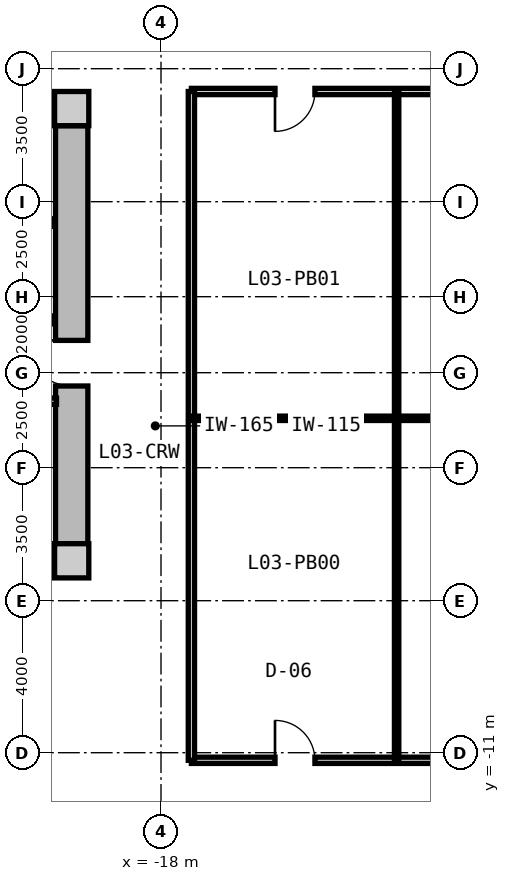
"""IFC4 building model, lengths in metres.
Left out: names, types, materials, properties, quantities, classifications, styles, units other than length and angle.
Written with IfcOpenShell. Run it as: python <this file> out.ifc"""

import sys

from ifc_helpers import new_model, si_unit, direction, frame, frame_2d, origin, origin_2d, place, context, subcontext, project, spatial, rectangle, extrude, source, transform, mapped, element, fill, save


model = new_model("IFC4")
c1 = context("Model", 3, precision=1e-05, world=origin(), true_north=direction((0.0, 1.0)))
c2 = subcontext(c1, "Body", "Model", "MODEL_VIEW")
j1 = project(units=[si_unit("LENGTHUNIT", "METRE"), si_unit("PLANEANGLEUNIT", "RADIAN")], contexts=[c1])
p1 = place(None, origin())
s1 = spatial("IfcSite", under=j1, at=p1, CompositionType="ELEMENT")
p2 = place(p1, origin())
s2 = spatial("IfcBuilding", under=s1, at=p2, CompositionType="ELEMENT")
p3 = place(p2, frame((0.0, 0.0, 12.6)))
s3 = spatial("IfcBuildingStorey", under=s2, at=p3, CompositionType="ELEMENT", Elevation=12.6)
m1 = source(origin(), c2, "Body", "SweptSolid", [
    extrude(rectangle(XDim=0.9, YDim=0.9, at=origin_2d()), origin(), (0.0, 0.0, 1.0), 4.2),
])
for number, where, z_axis, x_axis in (
    (1, (-20.35, -5.95, 0.0), (0.0, 0.0, 1.0), (1.0, 0.0, 0.0)),
    (2, (-20.35, 5.95, 0.0), (0.0, 0.0, 1.0), (1.0, 0.0, 0.0)),
):
    element("IfcColumn", number, at=place(p3, frame(where, z_axis=z_axis, x_axis=x_axis)), inside=s3, PredefinedType="COLUMN", context=c2, shape_type="MappedRepresentation", body=[
        mapped(m1, transform((0.0, 0.0, 0.0), x_axis=(1.0, 0.0, 0.0), y_axis=(0.0, 1.0, 0.0), z_axis=(0.0, 0.0, 1.0), scale=1.0)),
    ])
m2 = source(origin(), c2, "Body", "SweptSolid", [
    extrude(rectangle(XDim=14.4, YDim=0.85, at=frame_2d((7.2, 0.0))), origin(), (0.0, 0.0, 1.0), 3.88),
])
for number, where, z_axis, x_axis in (
    (3, (-35.2, 5.95, 0.0), (0.0, 0.0, 1.0), (1.0, 0.0, 0.0)),
    (4, (-20.8, -5.95, 0.0), (0.0, 0.0, 1.0), (-1.0, 0.0, 0.0)),
):
    element("IfcWall", number, at=place(p3, frame(where, z_axis=z_axis, x_axis=x_axis)), inside=s3, PredefinedType="SHEAR", context=c2, shape_type="MappedRepresentation", body=[
        mapped(m2, transform((0.0, 0.0, 0.0), x_axis=(1.0, 0.0, 0.0), y_axis=(0.0, 1.0, 0.0), z_axis=(0.0, 0.0, 1.0), scale=1.0)),
    ])
m3 = source(origin(), c2, "Body", "SweptSolid", [
    extrude(rectangle(XDim=11.0, YDim=0.85, at=frame_2d((5.5, 0.0))), origin(), (0.0, 0.0, 1.0), 3.88),
])
p4 = place(p3, frame((-20.35, 5.5, 0.0), z_axis=(0.0, 0.0, 1.0), x_axis=(0.0, -1.0, 0.0)))
e5 = element("IfcWall", 5, at=p4, inside=s3, PredefinedType="SHEAR", context=c2, shape_type="MappedRepresentation", body=[
    mapped(m3, transform((0.0, 0.0, 0.0), x_axis=(1.0, 0.0, 0.0), y_axis=(0.0, 1.0, 0.0), z_axis=(0.0, 0.0, 1.0), scale=1.0)),
])
p5 = place(p4, frame((5.65, 0.0, 0.0)))
e6 = element("IfcOpeningElement", 6, at=p5, cuts=e5, PredefinedType="OPENING", context=c2, shape_type="SweptSolid", body=[
    extrude(rectangle(XDim=1.2, YDim=2.15, at=frame_2d((0.6, 1.075))), frame((0.0, 0.435, 0.0), z_axis=(0.0, -1.0, 0.0), x_axis=(1.0, 0.0, 0.0)), (0.0, 0.0, 1.0), 0.87),
])
m4 = source(origin(), c2, "Body", "SweptSolid", [
    extrude(rectangle(XDim=3.2, YDim=0.2, at=frame_2d((1.6, 0.0))), origin(), (0.0, 0.0, 1.0), 3.865),
])
p6 = place(p3, frame((-24.0, 2.95, 0.0), z_axis=(0.0, 0.0, 1.0), x_axis=(1.0, 0.0, 0.0)))
e7 = element("IfcWall", 7, at=p6, inside=s3, PredefinedType="PARTITIONING", context=c2, shape_type="MappedRepresentation", body=[
    mapped(m4, transform((0.0, 0.0, 0.0), x_axis=(1.0, 0.0, 0.0), y_axis=(0.0, 1.0, 0.0), z_axis=(0.0, 0.0, 1.0), scale=1.0)),
])
m5 = source(origin(), c2, "Body", "SweptSolid", [
    extrude(rectangle(XDim=6.66, YDim=0.21, at=frame_2d((3.33, 0.0))), origin(), (0.0, 0.0, 1.0), 3.865),
])
p7 = place(p3, frame((-27.46, 0.39, 0.0), z_axis=(0.0, 0.0, 1.0), x_axis=(1.0, 0.0, 0.0)))
e8 = element("IfcWall", 8, at=p7, inside=s3, PredefinedType="PARTITIONING", context=c2, shape_type="MappedRepresentation", body=[
    mapped(m5, transform((0.0, 0.0, 0.0), x_axis=(1.0, 0.0, 0.0), y_axis=(0.0, 1.0, 0.0), z_axis=(0.0, 0.0, 1.0), scale=1.0)),
])
p8 = place(p7, frame((1.0, 0.0, 0.0)))
e9 = element("IfcOpeningElement", 9, at=p8, cuts=e8, PredefinedType="OPENING", context=c2, shape_type="SweptSolid", body=[
    extrude(rectangle(XDim=1.2, YDim=2.15, at=frame_2d((0.6, 1.075))), frame((0.0, 0.115, 0.0), z_axis=(0.0, -1.0, 0.0), x_axis=(1.0, 0.0, 0.0)), (0.0, 0.0, 1.0), 0.23),
])
m6 = source(origin(), c2, "Body", "SweptSolid", [
    extrude(rectangle(XDim=2.7, YDim=0.165, at=frame_2d((1.35, 0.0))), origin(), (0.0, 0.0, 1.0), 3.865),
])
p9 = place(p3, frame((-23.45, -1.75, 0.0), z_axis=(0.0, 0.0, 1.0), x_axis=(1.0, 0.0, 0.0)))
e10 = element("IfcWall", 10, at=p9, inside=s3, PredefinedType="PARTITIONING", context=c2, shape_type="MappedRepresentation", body=[
    mapped(m6, transform((0.0, 0.0, 0.0), x_axis=(1.0, 0.0, 0.0), y_axis=(0.0, 1.0, 0.0), z_axis=(0.0, 0.0, 1.0), scale=1.0)),
])
p10 = place(p9, frame((0.222, 0.0, 0.0)))
e11 = element("IfcOpeningElement", 11, at=p10, cuts=e10, PredefinedType="OPENING", context=c2, shape_type="SweptSolid", body=[
    extrude(rectangle(XDim=0.925, YDim=2.1, at=frame_2d((0.462, 1.05))), frame((0.0, 0.093, 0.0), z_axis=(0.0, -1.0, 0.0), x_axis=(1.0, 0.0, 0.0)), (0.0, 0.0, 1.0), 0.185),
])
p11 = place(p9, frame((1.522, 0.0, 0.0)))
e12 = element("IfcOpeningElement", 12, at=p11, cuts=e10, PredefinedType="OPENING", context=c2, shape_type="SweptSolid", body=[
    extrude(rectangle(XDim=0.925, YDim=2.1, at=frame_2d((0.462, 1.05))), frame((0.0, 0.093, 0.0), z_axis=(0.0, -1.0, 0.0), x_axis=(1.0, 0.0, 0.0)), (0.0, 0.0, 1.0), 0.185),
])
m7 = source(origin(), c2, "Body", "SweptSolid", [
    extrude(rectangle(XDim=34.4, YDim=0.165, at=frame_2d((17.2, 0.0))), origin(), (0.0, 0.0, 1.0), 3.865),
])
p12 = place(p3, frame((-17.2, -11.2, 0.0), z_axis=(0.0, 0.0, 1.0), x_axis=(1.0, 0.0, 0.0)))
e13 = element("IfcWall", 13, at=p12, inside=s3, PredefinedType="PARTITIONING", context=c2, shape_type="MappedRepresentation", body=[
    mapped(m7, transform((0.0, 0.0, 0.0), x_axis=(1.0, 0.0, 0.0), y_axis=(0.0, 1.0, 0.0), z_axis=(0.0, 0.0, 1.0), scale=1.0)),
])
p13 = place(p12, frame((2.2, 0.0, 0.0)))
e14 = element("IfcOpeningElement", 14, at=p13, cuts=e13, PredefinedType="OPENING", context=c2, shape_type="SweptSolid", body=[
    extrude(rectangle(XDim=1.05, YDim=2.15, at=frame_2d((0.525, 1.075))), frame((0.0, 0.093, 0.0), z_axis=(0.0, -1.0, 0.0), x_axis=(1.0, 0.0, 0.0)), (0.0, 0.0, 1.0), 0.185),
])
p14 = place(p12, frame((7.55, 0.0, 0.0)))
e15 = element("IfcOpeningElement", 15, at=p14, cuts=e13, PredefinedType="OPENING", context=c2, shape_type="SweptSolid", body=[
    extrude(rectangle(XDim=1.05, YDim=2.15, at=frame_2d((0.525, 1.075))), frame((0.0, 0.093, 0.0), z_axis=(0.0, -1.0, 0.0), x_axis=(1.0, 0.0, 0.0)), (0.0, 0.0, 1.0), 0.185),
])
p15 = place(p12, frame((13.45, 0.0, 0.0)))
e16 = element("IfcOpeningElement", 16, at=p15, cuts=e13, PredefinedType="OPENING", context=c2, shape_type="SweptSolid", body=[
    extrude(rectangle(XDim=1.05, YDim=2.15, at=frame_2d((0.525, 1.075))), frame((0.0, 0.093, 0.0), z_axis=(0.0, -1.0, 0.0), x_axis=(1.0, 0.0, 0.0)), (0.0, 0.0, 1.0), 0.185),
])
p16 = place(p12, frame((19.95, 0.0, 0.0)))
e17 = element("IfcOpeningElement", 17, at=p16, cuts=e13, PredefinedType="OPENING", context=c2, shape_type="SweptSolid", body=[
    extrude(rectangle(XDim=1.05, YDim=2.15, at=frame_2d((0.525, 1.075))), frame((0.0, 0.093, 0.0), z_axis=(0.0, -1.0, 0.0), x_axis=(1.0, 0.0, 0.0)), (0.0, 0.0, 1.0), 0.185),
])
p17 = place(p12, frame((25.85, 0.0, 0.0)))
e18 = element("IfcOpeningElement", 18, at=p17, cuts=e13, PredefinedType="OPENING", context=c2, shape_type="SweptSolid", body=[
    extrude(rectangle(XDim=1.05, YDim=2.15, at=frame_2d((0.525, 1.075))), frame((0.0, 0.093, 0.0), z_axis=(0.0, -1.0, 0.0), x_axis=(1.0, 0.0, 0.0)), (0.0, 0.0, 1.0), 0.185),
])
p18 = place(p12, frame((31.2, 0.0, 0.0)))
e19 = element("IfcOpeningElement", 19, at=p18, cuts=e13, PredefinedType="OPENING", context=c2, shape_type="SweptSolid", body=[
    extrude(rectangle(XDim=1.05, YDim=2.15, at=frame_2d((0.525, 1.075))), frame((0.0, 0.093, 0.0), z_axis=(0.0, -1.0, 0.0), x_axis=(1.0, 0.0, 0.0)), (0.0, 0.0, 1.0), 0.185),
])
p19 = place(p3, frame((-17.2, 6.4, 0.0), z_axis=(0.0, 0.0, 1.0), x_axis=(1.0, 0.0, 0.0)))
e20 = element("IfcWall", 20, at=p19, inside=s3, PredefinedType="PARTITIONING", context=c2, shape_type="MappedRepresentation", body=[
    mapped(m7, transform((0.0, 0.0, 0.0), x_axis=(1.0, 0.0, 0.0), y_axis=(0.0, 1.0, 0.0), z_axis=(0.0, 0.0, 1.0), scale=1.0)),
])
p20 = place(p19, frame((2.2, 0.0, 0.0)))
e21 = element("IfcOpeningElement", 21, at=p20, cuts=e20, PredefinedType="OPENING", context=c2, shape_type="SweptSolid", body=[
    extrude(rectangle(XDim=1.05, YDim=2.15, at=frame_2d((0.525, 1.075))), frame((0.0, 0.093, 0.0), z_axis=(0.0, -1.0, 0.0), x_axis=(1.0, 0.0, 0.0)), (0.0, 0.0, 1.0), 0.185),
])
p21 = place(p19, frame((7.55, 0.0, 0.0)))
e22 = element("IfcOpeningElement", 22, at=p21, cuts=e20, PredefinedType="OPENING", context=c2, shape_type="SweptSolid", body=[
    extrude(rectangle(XDim=1.05, YDim=2.15, at=frame_2d((0.525, 1.075))), frame((0.0, 0.093, 0.0), z_axis=(0.0, -1.0, 0.0), x_axis=(1.0, 0.0, 0.0)), (0.0, 0.0, 1.0), 0.185),
])
p22 = place(p19, frame((13.45, 0.0, 0.0)))
e23 = element("IfcOpeningElement", 23, at=p22, cuts=e20, PredefinedType="OPENING", context=c2, shape_type="SweptSolid", body=[
    extrude(rectangle(XDim=0.92, YDim=2.1, at=frame_2d((0.46, 1.05))), frame((0.0, 0.093, 0.0), z_axis=(0.0, -1.0, 0.0), x_axis=(1.0, 0.0, 0.0)), (0.0, 0.0, 1.0), 0.185),
])
p23 = place(p19, frame((19.95, 0.0, 0.0)))
e24 = element("IfcOpeningElement", 24, at=p23, cuts=e20, PredefinedType="OPENING", context=c2, shape_type="SweptSolid", body=[
    extrude(rectangle(XDim=1.05, YDim=2.15, at=frame_2d((0.525, 1.075))), frame((0.0, 0.093, 0.0), z_axis=(0.0, -1.0, 0.0), x_axis=(1.0, 0.0, 0.0)), (0.0, 0.0, 1.0), 0.185),
])
p24 = place(p19, frame((25.85, 0.0, 0.0)))
e25 = element("IfcOpeningElement", 25, at=p24, cuts=e20, PredefinedType="OPENING", context=c2, shape_type="SweptSolid", body=[
    extrude(rectangle(XDim=1.05, YDim=2.15, at=frame_2d((0.525, 1.075))), frame((0.0, 0.093, 0.0), z_axis=(0.0, -1.0, 0.0), x_axis=(1.0, 0.0, 0.0)), (0.0, 0.0, 1.0), 0.185),
])
p25 = place(p19, frame((31.2, 0.0, 0.0)))
e26 = element("IfcOpeningElement", 26, at=p25, cuts=e20, PredefinedType="OPENING", context=c2, shape_type="SweptSolid", body=[
    extrude(rectangle(XDim=0.92, YDim=2.1, at=frame_2d((0.46, 1.05))), frame((0.0, 0.093, 0.0), z_axis=(0.0, -1.0, 0.0), x_axis=(1.0, 0.0, 0.0)), (0.0, 0.0, 1.0), 0.185),
])
m8 = source(origin(), c2, "Body", "SweptSolid", [
    extrude(rectangle(XDim=17.6, YDim=0.165, at=frame_2d((8.8, 0.0))), origin(), (0.0, 0.0, 1.0), 3.865),
])
p26 = place(p3, frame((-17.2, -11.2, 0.0), z_axis=(0.0, 0.0, 1.0), x_axis=(0.0, 1.0, 0.0)))
e27 = element("IfcWall", 27, at=p26, inside=s3, PredefinedType="PARTITIONING", context=c2, shape_type="MappedRepresentation", body=[
    mapped(m8, transform((0.0, 0.0, 0.0), x_axis=(1.0, 0.0, 0.0), y_axis=(0.0, 1.0, 0.0), z_axis=(0.0, 0.0, 1.0), scale=1.0)),
])
m9 = source(origin(), c2, "Body", "SweptSolid", [
    extrude(rectangle(XDim=17.6, YDim=0.115, at=frame_2d((8.8, 0.0))), origin(), (0.0, 0.0, 1.0), 3.865),
])
p27 = place(p3, frame((-11.8, -11.2, 0.0), z_axis=(0.0, 0.0, 1.0), x_axis=(0.0, 1.0, 0.0)))
e28 = element("IfcWall", 28, at=p27, inside=s3, PredefinedType="PARTITIONING", context=c2, shape_type="MappedRepresentation", body=[
    mapped(m9, transform((0.0, 0.0, 0.0), x_axis=(1.0, 0.0, 0.0), y_axis=(0.0, 1.0, 0.0), z_axis=(0.0, 0.0, 1.0), scale=1.0)),
])
m10 = source(origin(), c2, "Body", "SweptSolid", [
    extrude(rectangle(XDim=34.4, YDim=0.115, at=frame_2d((17.2, 0.0))), origin(), (0.0, 0.0, 1.0), 3.865),
])
p28 = place(p3, frame((-17.2, -2.2, 0.0), z_axis=(0.0, 0.0, 1.0), x_axis=(1.0, 0.0, 0.0)))
e29 = element("IfcWall", 29, at=p28, inside=s3, PredefinedType="PARTITIONING", context=c2, shape_type="MappedRepresentation", body=[
    mapped(m10, transform((0.0, 0.0, 0.0), x_axis=(1.0, 0.0, 0.0), y_axis=(0.0, 1.0, 0.0), z_axis=(0.0, 0.0, 1.0), scale=1.0)),
])
m11 = source(origin(), c2, "Body", "SweptSolid", [
    extrude(rectangle(XDim=1.2, YDim=2.15, at=frame_2d((0.6, 1.075))), frame((0.0, 0.025, 0.0), z_axis=(0.0, -1.0, 0.0), x_axis=(1.0, 0.0, 0.0)), (0.0, 0.0, 1.0), 0.05),
])
p29 = place(p5, frame((1.2, 0.0, 0.0), z_axis=(0.0, 0.0, 1.0), x_axis=(-1.0, 0.0, 0.0)))
e30 = element("IfcDoor", 30, at=p29, inside=s3, OperationType="SINGLE_SWING_RIGHT", PredefinedType="DOOR", context=c2, shape_type="MappedRepresentation", body=[
    mapped(m11, transform((0.0, 0.0, 0.0), x_axis=(1.0, 0.0, 0.0), y_axis=(0.0, 1.0, 0.0), z_axis=(0.0, 0.0, 1.0), scale=1.0)),
])
fill(e6, e30)
m12 = source(origin(), c2, "Body", "SweptSolid", [
    extrude(rectangle(XDim=1.05, YDim=2.15, at=frame_2d((0.525, 1.075))), frame((0.0, 0.025, 0.0), z_axis=(0.0, -1.0, 0.0), x_axis=(1.0, 0.0, 0.0)), (0.0, 0.0, 1.0), 0.05),
])
p30 = place(p13, origin())
e31 = element("IfcDoor", 31, at=p30, inside=s3, OperationType="SINGLE_SWING_LEFT", PredefinedType="DOOR", context=c2, shape_type="MappedRepresentation", body=[
    mapped(m12, transform((0.0, 0.0, 0.0), x_axis=(1.0, 0.0, 0.0), y_axis=(0.0, 1.0, 0.0), z_axis=(0.0, 0.0, 1.0), scale=1.0)),
])
fill(e14, e31)
p31 = place(p20, frame((1.05, 0.0, 0.0), z_axis=(0.0, 0.0, 1.0), x_axis=(-1.0, 0.0, 0.0)))
e32 = element("IfcDoor", 32, at=p31, inside=s3, OperationType="SINGLE_SWING_RIGHT", PredefinedType="DOOR", context=c2, shape_type="MappedRepresentation", body=[
    mapped(m12, transform((0.0, 0.0, 0.0), x_axis=(1.0, 0.0, 0.0), y_axis=(0.0, 1.0, 0.0), z_axis=(0.0, 0.0, 1.0), scale=1.0)),
])
fill(e21, e32)
save(model, sys.argv[1])
